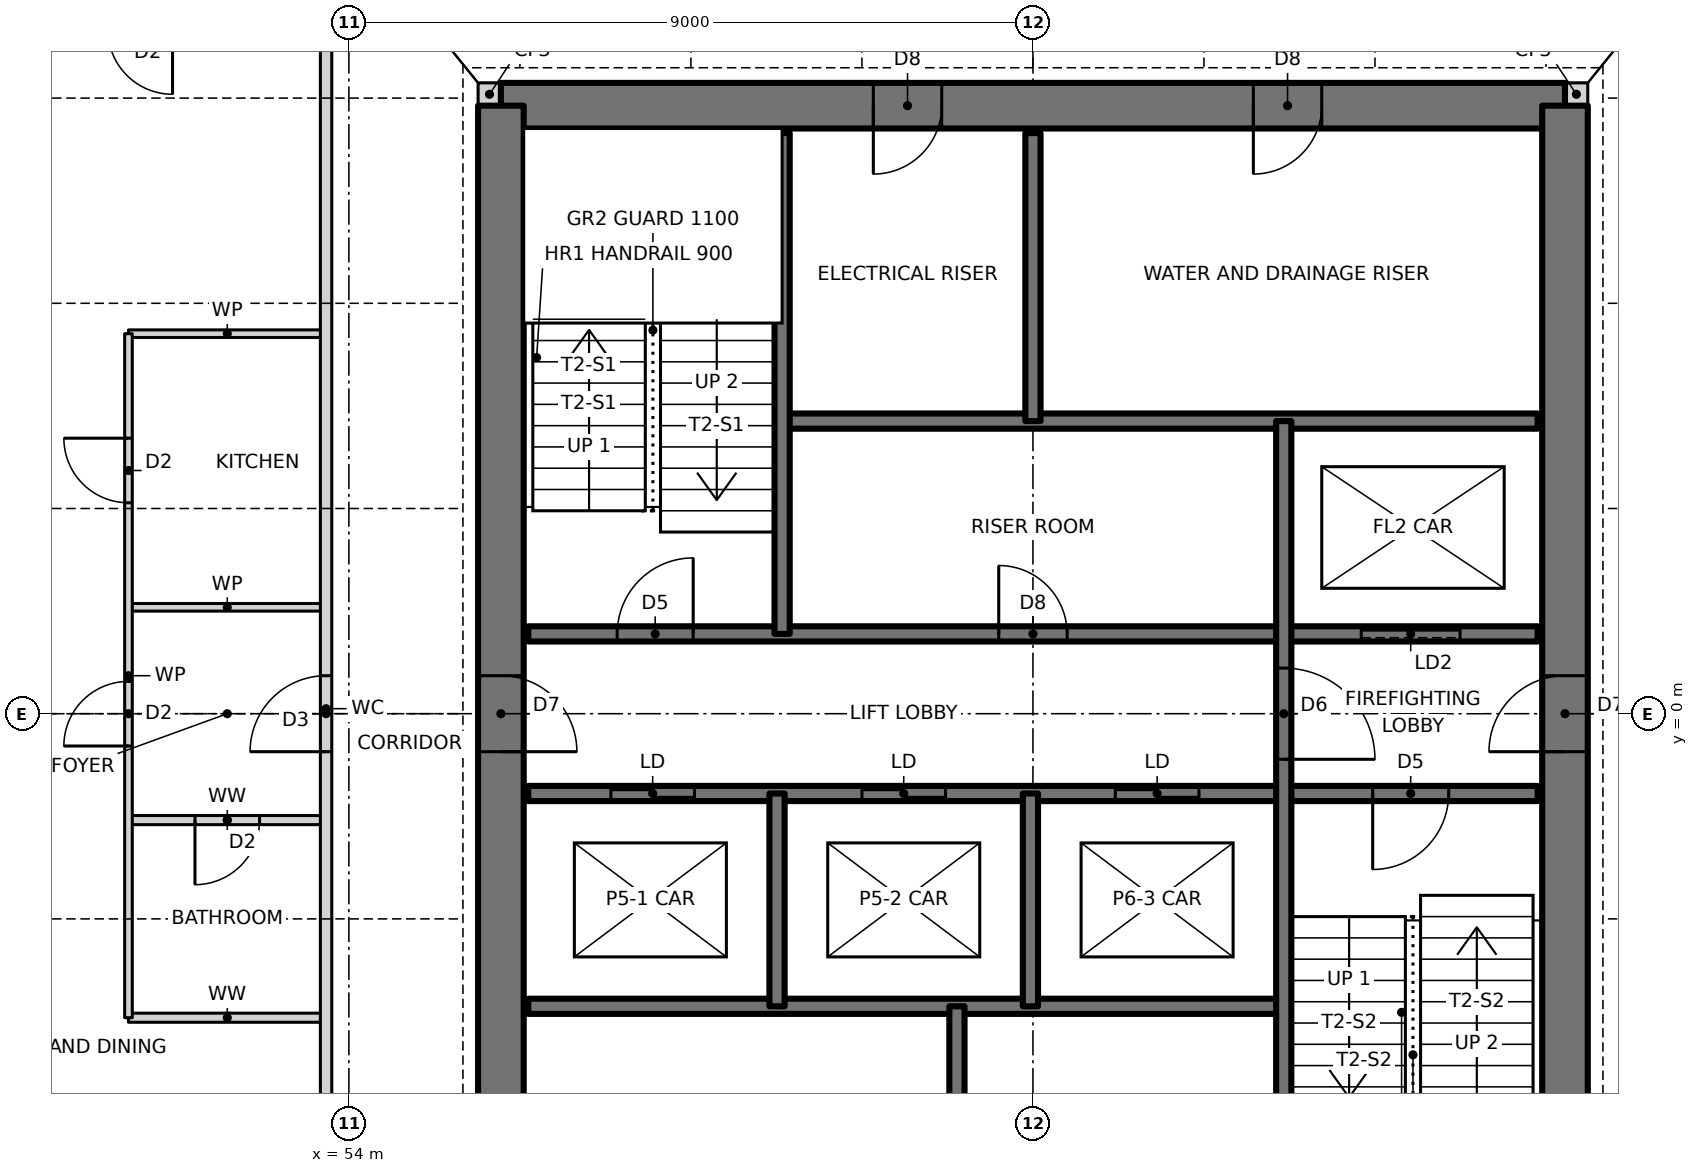
"""IFC4 building model, lengths in metres.
Left out: names, types, materials, properties, quantities, classifications, styles, units other than length and angle.
Written with IfcOpenShell. Run it as: python <this file> out.ifc"""

import sys

from ifc_helpers import new_model, si_unit, direction, frame, frame_2d, origin, place, context, subcontext, project, spatial, rectangle, extrude, element, fill, save


model = new_model("IFC4")
c1 = context("Model", 3, precision=1e-05, world=origin(), true_north=direction((0.0, 1.0)))
c2 = subcontext(c1, "Body", "Model", "MODEL_VIEW")
j1 = project(units=[si_unit("LENGTHUNIT", "METRE"), si_unit("PLANEANGLEUNIT", "RADIAN")], contexts=[c1])
p1 = place(None, origin())
s1 = spatial("IfcSite", under=j1, at=p1, CompositionType="ELEMENT")
p2 = place(p1, origin())
s2 = spatial("IfcBuilding", under=s1, at=p2, CompositionType="ELEMENT")
p3 = place(p2, frame((0.0, 0.0, 108.5)))
s3 = spatial("IfcBuildingStorey", under=s2, at=p3, CompositionType="ELEMENT", Elevation=108.5)
for number, where, z_axis, x_axis in (
    (1, (70.0, 8.15, 0.0), (0.0, 0.0, 1.0), (1.0, 0.0, 0.0)),
    (2, (55.7, 8.15, 0.0), (0.0, 0.0, 1.0), (1.0, 0.0, 0.0)),
):
    element("IfcWall", number, at=place(p3, frame(where, z_axis=z_axis, x_axis=x_axis)), inside=s3, PredefinedType="SOLIDWALL", context=c2, shape_type="SweptSolid", body=[
        extrude(rectangle(XDim=0.3, YDim=0.3, at=frame_2d((0.15, 0.0))), origin(), (0.0, 0.0, 1.0), 3.5),
    ])
p4 = place(p3, frame((70.0, 8.0, 0.0), z_axis=(0.0, 0.0, 1.0), x_axis=(-1.0, 0.0, 0.0)))
e3 = element("IfcWall", 3, at=p4, inside=s3, PredefinedType="SHEAR", context=c2, shape_type="SweptSolid", body=[
    extrude(rectangle(XDim=14.0, YDim=0.6, at=frame_2d((7.0, 0.0))), origin(), (0.0, 0.0, 1.0), 3.5),
])
p5 = place(p4, frame((8.2, 0.0, 0.0)))
e4 = element("IfcOpeningElement", 4, at=p5, cuts=e3, PredefinedType="OPENING", context=c2, shape_type="SweptSolid", body=[
    extrude(rectangle(XDim=0.9, YDim=2.1, at=frame_2d((0.45, 1.05))), frame((0.0, 0.31, 0.0), z_axis=(0.0, -1.0, 0.0), x_axis=(1.0, 0.0, 0.0)), (0.0, 0.0, 1.0), 0.62),
])
p6 = place(p4, frame((3.2, 0.0, 0.0)))
e5 = element("IfcOpeningElement", 5, at=p6, cuts=e3, PredefinedType="OPENING", context=c2, shape_type="SweptSolid", body=[
    extrude(rectangle(XDim=0.9, YDim=2.1, at=frame_2d((0.45, 1.05))), frame((0.0, 0.31, 0.0), z_axis=(0.0, -1.0, 0.0), x_axis=(1.0, 0.0, 0.0)), (0.0, 0.0, 1.0), 0.62),
])
p7 = place(p3, frame((70.0, -8.0, 0.0), z_axis=(0.0, 0.0, 1.0), x_axis=(0.0, 1.0, 0.0)))
e6 = element("IfcWall", 6, at=p7, inside=s3, PredefinedType="SHEAR", context=c2, shape_type="SweptSolid", body=[
    extrude(rectangle(XDim=16.0, YDim=0.6, at=frame_2d((8.0, 0.0))), origin(), (0.0, 0.0, 1.0), 3.5),
])
p8 = place(p7, frame((7.5, 0.0, 0.0)))
e7 = element("IfcOpeningElement", 7, at=p8, cuts=e6, PredefinedType="OPENING", context=c2, shape_type="SweptSolid", body=[
    extrude(rectangle(XDim=1.0, YDim=2.1, at=frame_2d((0.5, 1.05))), frame((0.0, 0.31, 0.0), z_axis=(0.0, -1.0, 0.0), x_axis=(1.0, 0.0, 0.0)), (0.0, 0.0, 1.0), 0.62),
])
p9 = place(p3, frame((56.0, 8.0, 0.0), z_axis=(0.0, 0.0, 1.0), x_axis=(0.0, -1.0, 0.0)))
e8 = element("IfcWall", 8, at=p9, inside=s3, PredefinedType="SHEAR", context=c2, shape_type="SweptSolid", body=[
    extrude(rectangle(XDim=16.0, YDim=0.6, at=frame_2d((8.0, 0.0))), origin(), (0.0, 0.0, 1.0), 3.5),
])
p10 = place(p9, frame((7.5, 0.0, 0.0)))
e9 = element("IfcOpeningElement", 9, at=p10, cuts=e8, PredefinedType="OPENING", context=c2, shape_type="SweptSolid", body=[
    extrude(rectangle(XDim=1.0, YDim=2.1, at=frame_2d((0.5, 1.05))), frame((0.0, 0.31, 0.0), z_axis=(0.0, -1.0, 0.0), x_axis=(1.0, 0.0, 0.0)), (0.0, 0.0, 1.0), 0.62),
])
p11 = place(p3, frame((51.1, -4.0, 0.0), z_axis=(0.0, 0.0, 1.0), x_axis=(1.0, 0.0, 0.0)))
e10 = element("IfcWall", 10, at=p11, inside=s3, PredefinedType="PARTITIONING", context=c2, shape_type="SweptSolid", body=[
    extrude(rectangle(XDim=2.6, YDim=0.12, at=frame_2d((1.3, 0.0))), origin(), (0.0, 0.0, 1.0), 3.27),
])
p12 = place(p3, frame((56.36, -3.85, 0.0), z_axis=(0.0, 0.0, 1.0), x_axis=(1.0, 0.0, 0.0)))
e11 = element("IfcWall", 11, at=p12, inside=s3, PredefinedType="SOLIDWALL", context=c2, shape_type="SweptSolid", body=[
    extrude(rectangle(XDim=9.94, YDim=0.2, at=frame_2d((4.97, 0.0))), origin(), (0.0, 0.0, 1.0), 3.5),
])
p13 = place(p3, frame((51.1, -1.4, 0.0), z_axis=(0.0, 0.0, 1.0), x_axis=(1.0, 0.0, 0.0)))
e12 = element("IfcWall", 12, at=p13, inside=s3, PredefinedType="PARTITIONING", context=c2, shape_type="SweptSolid", body=[
    extrude(rectangle(XDim=2.6, YDim=0.12, at=frame_2d((1.3, 0.0))), origin(), (0.0, 0.0, 1.0), 3.27),
])
p14 = place(p13, frame((0.875, 0.0, 0.0)))
e13 = element("IfcOpeningElement", 13, at=p14, cuts=e12, PredefinedType="OPENING", context=c2, shape_type="SweptSolid", body=[
    extrude(rectangle(XDim=0.85, YDim=2.1, at=frame_2d((0.425, 1.05))), frame((0.0, 0.07, 0.0), z_axis=(0.0, -1.0, 0.0), x_axis=(1.0, 0.0, 0.0)), (0.0, 0.0, 1.0), 0.14),
])
p15 = place(p3, frame((56.36, -1.05, 0.0), z_axis=(0.0, 0.0, 1.0), x_axis=(1.0, 0.0, 0.0)))
e14 = element("IfcWall", 14, at=p15, inside=s3, PredefinedType="SOLIDWALL", context=c2, shape_type="SweptSolid", body=[
    extrude(rectangle(XDim=13.28, YDim=0.2, at=frame_2d((6.64, 0.0))), origin(), (0.0, 0.0, 1.0), 3.5),
])
p16 = place(p15, frame((11.11, 0.0, 0.0)))
e15 = element("IfcOpeningElement", 15, at=p16, cuts=e14, PredefinedType="OPENING", context=c2, shape_type="SweptSolid", body=[
    extrude(rectangle(XDim=1.0, YDim=2.1, at=frame_2d((0.5, 1.05))), frame((0.0, 0.11, 0.0), z_axis=(0.0, -1.0, 0.0), x_axis=(1.0, 0.0, 0.0)), (0.0, 0.0, 1.0), 0.22),
])
p17 = place(p15, frame((1.087, 0.0, 0.0)))
e16 = element("IfcOpeningElement", 16, at=p17, cuts=e14, PredefinedType="OPENING", context=c2, shape_type="SweptSolid", body=[
    extrude(rectangle(XDim=1.1, YDim=2.1, at=frame_2d((0.55, 1.05))), frame((0.0, 0.11, 0.0), z_axis=(0.0, -1.0, 0.0), x_axis=(1.0, 0.0, 0.0)), (0.0, 0.0, 1.0), 0.22),
])
p18 = place(p15, frame((4.39, 0.0, 0.0)))
e17 = element("IfcOpeningElement", 17, at=p18, cuts=e14, PredefinedType="OPENING", context=c2, shape_type="SweptSolid", body=[
    extrude(rectangle(XDim=1.1, YDim=2.1, at=frame_2d((0.55, 1.05))), frame((0.0, 0.11, 0.0), z_axis=(0.0, -1.0, 0.0), x_axis=(1.0, 0.0, 0.0)), (0.0, 0.0, 1.0), 0.22),
])
p19 = place(p15, frame((7.724, 0.0, 0.0)))
e18 = element("IfcOpeningElement", 18, at=p19, cuts=e14, PredefinedType="OPENING", context=c2, shape_type="SweptSolid", body=[
    extrude(rectangle(XDim=1.1, YDim=2.1, at=frame_2d((0.55, 1.05))), frame((0.0, 0.11, 0.0), z_axis=(0.0, -1.0, 0.0), x_axis=(1.0, 0.0, 0.0)), (0.0, 0.0, 1.0), 0.22),
])
p20 = place(p3, frame((56.36, 1.05, 0.0), z_axis=(0.0, 0.0, 1.0), x_axis=(1.0, 0.0, 0.0)))
e19 = element("IfcWall", 19, at=p20, inside=s3, PredefinedType="SOLIDWALL", context=c2, shape_type="SweptSolid", body=[
    extrude(rectangle(XDim=13.28, YDim=0.2, at=frame_2d((6.64, 0.0))), origin(), (0.0, 0.0, 1.0), 3.5),
])
p21 = place(p20, frame((1.17, 0.0, 0.0)))
e20 = element("IfcOpeningElement", 20, at=p21, cuts=e19, PredefinedType="OPENING", context=c2, shape_type="SweptSolid", body=[
    extrude(rectangle(XDim=1.0, YDim=2.1, at=frame_2d((0.5, 1.05))), frame((0.0, 0.11, 0.0), z_axis=(0.0, -1.0, 0.0), x_axis=(1.0, 0.0, 0.0)), (0.0, 0.0, 1.0), 0.22),
])
p22 = place(p20, frame((6.19, 0.0, 0.0)))
e21 = element("IfcOpeningElement", 21, at=p22, cuts=e19, PredefinedType="OPENING", context=c2, shape_type="SweptSolid", body=[
    extrude(rectangle(XDim=0.9, YDim=2.1, at=frame_2d((0.45, 1.05))), frame((0.0, 0.11, 0.0), z_axis=(0.0, -1.0, 0.0), x_axis=(1.0, 0.0, 0.0)), (0.0, 0.0, 1.0), 0.22),
])
p23 = place(p20, frame((10.96, 0.0, 0.0)))
e22 = element("IfcOpeningElement", 22, at=p23, cuts=e19, PredefinedType="OPENING", context=c2, shape_type="SweptSolid", body=[
    extrude(rectangle(XDim=1.3, YDim=2.1, at=frame_2d((0.65, 1.05))), frame((0.0, 0.11, 0.0), z_axis=(0.0, -1.0, 0.0), x_axis=(1.0, 0.0, 0.0)), (0.0, 0.0, 1.0), 0.22),
])
p24 = place(p3, frame((51.1, 1.4, 0.0), z_axis=(0.0, 0.0, 1.0), x_axis=(1.0, 0.0, 0.0)))
e23 = element("IfcWall", 23, at=p24, inside=s3, PredefinedType="PARTITIONING", context=c2, shape_type="SweptSolid", body=[
    extrude(rectangle(XDim=2.6, YDim=0.1, at=frame_2d((1.3, 0.0))), origin(), (0.0, 0.0, 1.0), 3.27),
])
p25 = place(p3, frame((59.7, 3.85, 0.0), z_axis=(0.0, 0.0, 1.0), x_axis=(1.0, 0.0, 0.0)))
e24 = element("IfcWall", 24, at=p25, inside=s3, PredefinedType="SOLIDWALL", context=c2, shape_type="SweptSolid", body=[
    extrude(rectangle(XDim=9.94, YDim=0.2, at=frame_2d((4.97, 0.0))), origin(), (0.0, 0.0, 1.0), 3.5),
])
p26 = place(p3, frame((51.1, 5.0, 0.0), z_axis=(0.0, 0.0, 1.0), x_axis=(1.0, 0.0, 0.0)))
e25 = element("IfcWall", 25, at=p26, inside=s3, PredefinedType="PARTITIONING", context=c2, shape_type="SweptSolid", body=[
    extrude(rectangle(XDim=2.6, YDim=0.1, at=frame_2d((1.3, 0.0))), origin(), (0.0, 0.0, 1.0), 3.27),
])
p27 = place(p3, frame((66.3, -7.64, 0.0), z_axis=(0.0, 0.0, 1.0), x_axis=(0.0, 1.0, 0.0)))
e26 = element("IfcWall", 26, at=p27, inside=s3, PredefinedType="SOLIDWALL", context=c2, shape_type="SweptSolid", body=[
    extrude(rectangle(XDim=11.49, YDim=0.2, at=frame_2d((5.745, 0.0))), origin(), (0.0, 0.0, 1.0), 3.5),
])
p28 = place(p27, frame((7.04, 0.0, 0.0)))
e27 = element("IfcOpeningElement", 27, at=p28, cuts=e26, PredefinedType="OPENING", context=c2, shape_type="SweptSolid", body=[
    extrude(rectangle(XDim=1.2, YDim=2.1, at=frame_2d((0.6, 1.05))), frame((0.0, 0.11, 0.0), z_axis=(0.0, -1.0, 0.0), x_axis=(1.0, 0.0, 0.0)), (0.0, 0.0, 1.0), 0.22),
])
p29 = place(p3, frame((63.0, 3.85, 0.0), z_axis=(0.0, 0.0, 1.0), x_axis=(0.0, 1.0, 0.0)))
e28 = element("IfcWall", 28, at=p29, inside=s3, PredefinedType="SOLIDWALL", context=c2, shape_type="SweptSolid", body=[
    extrude(rectangle(XDim=3.79, YDim=0.2, at=frame_2d((1.895, 0.0))), origin(), (0.0, 0.0, 1.0), 3.5),
])
p30 = place(p3, frame((62.967, -3.85, 0.0), z_axis=(0.0, 0.0, 1.0), x_axis=(0.0, 1.0, 0.0)))
e29 = element("IfcWall", 29, at=p30, inside=s3, PredefinedType="SOLIDWALL", context=c2, shape_type="SweptSolid", body=[
    extrude(rectangle(XDim=2.8, YDim=0.2, at=frame_2d((1.4, 0.0))), origin(), (0.0, 0.0, 1.0), 3.5),
])
p31 = place(p3, frame((62.0, -7.64, 0.0), z_axis=(0.0, 0.0, 1.0), x_axis=(0.0, 1.0, 0.0)))
e30 = element("IfcWall", 30, at=p31, inside=s3, PredefinedType="SOLIDWALL", context=c2, shape_type="SweptSolid", body=[
    extrude(rectangle(XDim=3.79, YDim=0.2, at=frame_2d((1.895, 0.0))), origin(), (0.0, 0.0, 1.0), 3.5),
])
p32 = place(p3, frame((59.7, 1.05, 0.0), z_axis=(0.0, 0.0, 1.0), x_axis=(0.0, 1.0, 0.0)))
e31 = element("IfcWall", 31, at=p32, inside=s3, PredefinedType="SOLIDWALL", context=c2, shape_type="SweptSolid", body=[
    extrude(rectangle(XDim=6.59, YDim=0.2, at=frame_2d((3.295, 0.0))), origin(), (0.0, 0.0, 1.0), 3.5),
])
p33 = place(p3, frame((59.633, -3.85, 0.0), z_axis=(0.0, 0.0, 1.0), x_axis=(0.0, 1.0, 0.0)))
e32 = element("IfcWall", 32, at=p33, inside=s3, PredefinedType="SOLIDWALL", context=c2, shape_type="SweptSolid", body=[
    extrude(rectangle(XDim=2.8, YDim=0.2, at=frame_2d((1.4, 0.0))), origin(), (0.0, 0.0, 1.0), 3.5),
])
p34 = place(p3, frame((53.7, -10.768, 0.0), z_axis=(0.0, 0.0, 1.0), x_axis=(0.0, 1.0, 0.0)))
e33 = element("IfcWall", 33, at=p34, inside=s3, PredefinedType="PARTITIONING", context=c2, shape_type="SweptSolid", body=[
    extrude(rectangle(XDim=21.668, YDim=0.15, at=frame_2d((10.834, 0.0))), origin(), (0.0, 0.0, 1.0), 3.27),
])
p35 = place(p34, frame((10.268, 0.0, 0.0)))
e34 = element("IfcOpeningElement", 34, at=p35, cuts=e33, PredefinedType="OPENING", context=c2, shape_type="SweptSolid", body=[
    extrude(rectangle(XDim=1.0, YDim=2.1, at=frame_2d((0.5, 1.05))), frame((0.0, 0.085, 0.0), z_axis=(0.0, -1.0, 0.0), x_axis=(1.0, 0.0, 0.0)), (0.0, 0.0, 1.0), 0.17),
])
p36 = place(p3, frame((51.1, -4.0, 0.0), z_axis=(0.0, 0.0, 1.0), x_axis=(0.0, 1.0, 0.0)))
e35 = element("IfcWall", 35, at=p36, inside=s3, PredefinedType="PARTITIONING", context=c2, shape_type="SweptSolid", body=[
    extrude(rectangle(XDim=9.0, YDim=0.1, at=frame_2d((4.5, 0.0))), origin(), (0.0, 0.0, 1.0), 3.27),
])
p37 = place(p36, frame((6.775, 0.0, 0.0)))
e36 = element("IfcOpeningElement", 36, at=p37, cuts=e35, PredefinedType="OPENING", context=c2, shape_type="SweptSolid", body=[
    extrude(rectangle(XDim=0.85, YDim=2.1, at=frame_2d((0.425, 1.05))), frame((0.0, 0.06, 0.0), z_axis=(0.0, -1.0, 0.0), x_axis=(1.0, 0.0, 0.0)), (0.0, 0.0, 1.0), 0.12),
])
p38 = place(p36, frame((3.575, 0.0, 0.0)))
e37 = element("IfcOpeningElement", 37, at=p38, cuts=e35, PredefinedType="OPENING", context=c2, shape_type="SweptSolid", body=[
    extrude(rectangle(XDim=0.85, YDim=2.1, at=frame_2d((0.425, 1.05))), frame((0.0, 0.06, 0.0), z_axis=(0.0, -1.0, 0.0), x_axis=(1.0, 0.0, 0.0)), (0.0, 0.0, 1.0), 0.12),
])
p39 = place(p21, origin())
e38 = element("IfcDoor", 38, at=p39, inside=s3, OperationType="SINGLE_SWING_RIGHT", PredefinedType="DOOR", context=c2, shape_type="SweptSolid", body=[
    extrude(rectangle(XDim=1.0, YDim=2.1, at=frame_2d((0.5, 1.05))), frame((0.0, 0.025, 0.0), z_axis=(0.0, -1.0, 0.0), x_axis=(1.0, 0.0, 0.0)), (0.0, 0.0, 1.0), 0.05),
])
fill(e20, e38)
p40 = place(p16, frame((1.0, 0.0, 0.0), z_axis=(0.0, 0.0, 1.0), x_axis=(-1.0, 0.0, 0.0)))
e39 = element("IfcDoor", 39, at=p40, inside=s3, OperationType="SINGLE_SWING_RIGHT", PredefinedType="DOOR", context=c2, shape_type="SweptSolid", body=[
    extrude(rectangle(XDim=1.0, YDim=2.1, at=frame_2d((0.5, 1.05))), frame((0.0, 0.025, 0.0), z_axis=(0.0, -1.0, 0.0), x_axis=(1.0, 0.0, 0.0)), (0.0, 0.0, 1.0), 0.05),
])
fill(e15, e39)
p41 = place(p28, frame((1.2, 0.0, 0.0), z_axis=(0.0, 0.0, 1.0), x_axis=(-1.0, 0.0, 0.0)))
e40 = element("IfcDoor", 40, at=p41, inside=s3, OperationType="SINGLE_SWING_RIGHT", PredefinedType="DOOR", context=c2, shape_type="SweptSolid", body=[
    extrude(rectangle(XDim=1.2, YDim=2.1, at=frame_2d((0.6, 1.05))), frame((0.0, 0.025, 0.0), z_axis=(0.0, -1.0, 0.0), x_axis=(1.0, 0.0, 0.0)), (0.0, 0.0, 1.0), 0.05),
])
fill(e27, e40)
p42 = place(p22, origin())
e41 = element("IfcDoor", 41, at=p42, inside=s3, OperationType="SINGLE_SWING_LEFT", PredefinedType="DOOR", context=c2, shape_type="SweptSolid", body=[
    extrude(rectangle(XDim=0.9, YDim=2.1, at=frame_2d((0.45, 1.05))), frame((0.0, 0.025, 0.0), z_axis=(0.0, -1.0, 0.0), x_axis=(1.0, 0.0, 0.0)), (0.0, 0.0, 1.0), 0.05),
])
fill(e21, e41)
p43 = place(p37, origin())
e42 = element("IfcDoor", 42, at=p43, inside=s3, OperationType="SINGLE_SWING_RIGHT", PredefinedType="DOOR", context=c2, shape_type="SweptSolid", body=[
    extrude(rectangle(XDim=0.85, YDim=2.1, at=frame_2d((0.425, 1.05))), frame((0.0, 0.025, 0.0), z_axis=(0.0, -1.0, 0.0), x_axis=(1.0, 0.0, 0.0)), (0.0, 0.0, 1.0), 0.05),
])
fill(e36, e42)
p44 = place(p35, origin())
e43 = element("IfcDoor", 43, at=p44, inside=s3, OperationType="SINGLE_SWING_LEFT", PredefinedType="DOOR", context=c2, shape_type="SweptSolid", body=[
    extrude(rectangle(XDim=1.0, YDim=2.1, at=frame_2d((0.5, 1.05))), frame((0.0, 0.025, 0.0), z_axis=(0.0, -1.0, 0.0), x_axis=(1.0, 0.0, 0.0)), (0.0, 0.0, 1.0), 0.05),
])
fill(e34, e43)
p45 = place(p38, origin())
e44 = element("IfcDoor", 44, at=p45, inside=s3, OperationType="SINGLE_SWING_LEFT", PredefinedType="DOOR", context=c2, shape_type="SweptSolid", body=[
    extrude(rectangle(XDim=0.85, YDim=2.1, at=frame_2d((0.425, 1.05))), frame((0.0, 0.025, 0.0), z_axis=(0.0, -1.0, 0.0), x_axis=(1.0, 0.0, 0.0)), (0.0, 0.0, 1.0), 0.05),
])
fill(e37, e44)
p46 = place(p14, frame((0.85, 0.0, 0.0), z_axis=(0.0, 0.0, 1.0), x_axis=(-1.0, 0.0, 0.0)))
e45 = element("IfcDoor", 45, at=p46, inside=s3, OperationType="SINGLE_SWING_RIGHT", PredefinedType="DOOR", context=c2, shape_type="SweptSolid", body=[
    extrude(rectangle(XDim=0.85, YDim=2.1, at=frame_2d((0.425, 1.05))), frame((0.0, 0.025, 0.0), z_axis=(0.0, -1.0, 0.0), x_axis=(1.0, 0.0, 0.0)), (0.0, 0.0, 1.0), 0.05),
])
fill(e13, e45)
p47 = place(p10, origin())
e46 = element("IfcDoor", 46, at=p47, inside=s3, OperationType="SINGLE_SWING_RIGHT", PredefinedType="DOOR", context=c2, shape_type="SweptSolid", body=[
    extrude(rectangle(XDim=1.0, YDim=2.1, at=frame_2d((0.5, 1.05))), frame((0.0, 0.025, 0.0), z_axis=(0.0, -1.0, 0.0), x_axis=(1.0, 0.0, 0.0)), (0.0, 0.0, 1.0), 0.05),
])
fill(e9, e46)
p48 = place(p8, origin())
e47 = element("IfcDoor", 47, at=p48, inside=s3, OperationType="SINGLE_SWING_LEFT", PredefinedType="DOOR", context=c2, shape_type="SweptSolid", body=[
    extrude(rectangle(XDim=1.0, YDim=2.1, at=frame_2d((0.5, 1.05))), frame((0.0, 0.025, 0.0), z_axis=(0.0, -1.0, 0.0), x_axis=(1.0, 0.0, 0.0)), (0.0, 0.0, 1.0), 0.05),
])
fill(e7, e47)
p49 = place(p5, origin())
e48 = element("IfcDoor", 48, at=p49, inside=s3, OperationType="SINGLE_SWING_RIGHT", PredefinedType="DOOR", context=c2, shape_type="SweptSolid", body=[
    extrude(rectangle(XDim=0.9, YDim=2.1, at=frame_2d((0.45, 1.05))), frame((0.0, 0.025, 0.0), z_axis=(0.0, -1.0, 0.0), x_axis=(1.0, 0.0, 0.0)), (0.0, 0.0, 1.0), 0.05),
])
fill(e4, e48)
p50 = place(p6, origin())
e49 = element("IfcDoor", 49, at=p50, inside=s3, OperationType="SINGLE_SWING_RIGHT", PredefinedType="DOOR", context=c2, shape_type="SweptSolid", body=[
    extrude(rectangle(XDim=0.9, YDim=2.1, at=frame_2d((0.45, 1.05))), frame((0.0, 0.025, 0.0), z_axis=(0.0, -1.0, 0.0), x_axis=(1.0, 0.0, 0.0)), (0.0, 0.0, 1.0), 0.05),
])
fill(e5, e49)
p51 = place(p17, origin())
e50 = element("IfcDoor", 50, at=p51, inside=s3, OperationType="DOUBLE_DOOR_SLIDING", PredefinedType="DOOR", context=c2, shape_type="SweptSolid", body=[
    extrude(rectangle(XDim=1.1, YDim=2.1, at=frame_2d((0.55, 1.05))), frame((0.0, 0.025, 0.0), z_axis=(0.0, -1.0, 0.0), x_axis=(1.0, 0.0, 0.0)), (0.0, 0.0, 1.0), 0.05),
])
fill(e16, e50)
p52 = place(p18, origin())
e51 = element("IfcDoor", 51, at=p52, inside=s3, OperationType="DOUBLE_DOOR_SLIDING", PredefinedType="DOOR", context=c2, shape_type="SweptSolid", body=[
    extrude(rectangle(XDim=1.1, YDim=2.1, at=frame_2d((0.55, 1.05))), frame((0.0, 0.025, 0.0), z_axis=(0.0, -1.0, 0.0), x_axis=(1.0, 0.0, 0.0)), (0.0, 0.0, 1.0), 0.05),
])
fill(e17, e51)
p53 = place(p19, origin())
e52 = element("IfcDoor", 52, at=p53, inside=s3, OperationType="DOUBLE_DOOR_SLIDING", PredefinedType="DOOR", context=c2, shape_type="SweptSolid", body=[
    extrude(rectangle(XDim=1.1, YDim=2.1, at=frame_2d((0.55, 1.05))), frame((0.0, 0.025, 0.0), z_axis=(0.0, -1.0, 0.0), x_axis=(1.0, 0.0, 0.0)), (0.0, 0.0, 1.0), 0.05),
])
fill(e18, e52)
p54 = place(p23, origin())
e53 = element("IfcDoor", 53, at=p54, inside=s3, OperationType="SLIDING_TO_LEFT", PredefinedType="DOOR", context=c2, shape_type="SweptSolid", body=[
    extrude(rectangle(XDim=1.3, YDim=2.1, at=frame_2d((0.65, 1.05))), frame((0.0, 0.025, 0.0), z_axis=(0.0, -1.0, 0.0), x_axis=(1.0, 0.0, 0.0)), (0.0, 0.0, 1.0), 0.05),
])
fill(e22, e53)
save(model, sys.argv[1])
